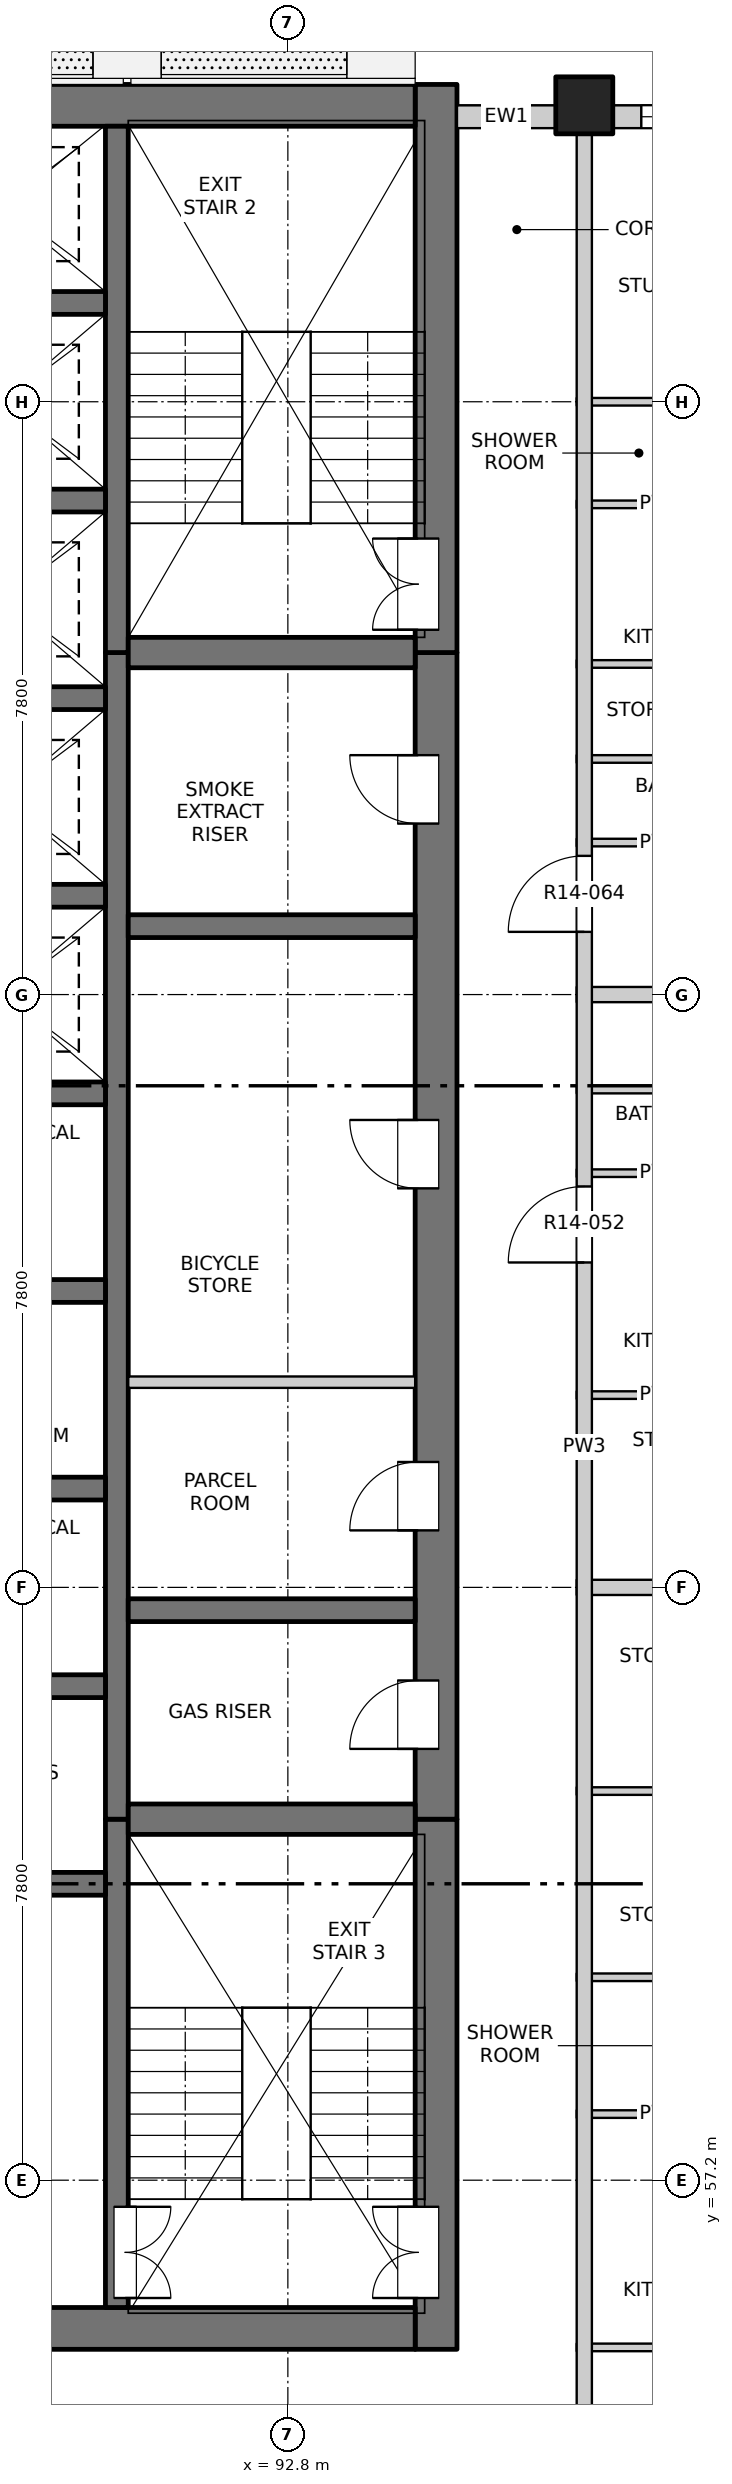
"""IFC4 building model, lengths in metres.
Left out: names, types, materials, properties, quantities, classifications, styles, units other than length and angle.
Written with IfcOpenShell. Run it as: python <this file> out.ifc"""

import sys

from ifc_helpers import new_model, si_unit, direction, frame, frame_2d, origin, origin_2d, place, context, subcontext, project, spatial, rectangle, extrude, element, fill, save


model = new_model("IFC4")
c1 = context("Model", 3, precision=1e-05, world=origin(), true_north=direction((0.0, 1.0)))
c2 = subcontext(c1, "Body", "Model", "MODEL_VIEW")
j1 = project(units=[si_unit("LENGTHUNIT", "METRE"), si_unit("PLANEANGLEUNIT", "RADIAN")], contexts=[c1])
p1 = place(None, origin())
s1 = spatial("IfcSite", under=j1, at=p1, CompositionType="ELEMENT")
p2 = place(p1, origin())
s2 = spatial("IfcBuilding", under=s1, at=p2, CompositionType="ELEMENT")
p3 = place(p2, frame((0.0, 0.0, 152.0)))
s3 = spatial("IfcBuildingStorey", under=s2, at=p3, CompositionType="ELEMENT", Elevation=152.0)
p4 = place(p3, frame((96.7, 84.5, -0.25), z_axis=(0.0, 0.0, 1.0), x_axis=(1.0, 0.0, 0.0)))
e1 = element("IfcColumn", 1, at=p4, inside=s3, PredefinedType="COLUMN", context=c2, shape_type="SweptSolid", body=[
    extrude(rectangle(XDim=0.75, YDim=0.75, at=origin_2d()), origin(), (0.0, 0.0, 1.0), 3.4),
])
p5 = place(p3, frame((94.75, 54.975, -0.25), z_axis=(0.0, 0.0, 1.0), x_axis=(0.0, 1.0, 0.0)))
e2 = element("IfcWall", 2, at=p5, inside=s3, PredefinedType="SOLIDWALL", context=c2, shape_type="SweptSolid", body=[
    extrude(rectangle(XDim=6.975, YDim=0.55, at=frame_2d((3.487, 0.0))), origin(), (0.0, 0.0, 1.0), 3.4),
])
p6 = place(p5, frame((0.675, 0.0, 0.25)))
e3 = element("IfcOpeningElement", 3, at=p6, cuts=e2, PredefinedType="OPENING", context=c2, shape_type="SweptSolid", body=[
    extrude(rectangle(XDim=1.2, YDim=2.1, at=frame_2d((0.6, 1.05))), frame((0.0, 0.285, 0.0), z_axis=(0.0, -1.0, 0.0), x_axis=(1.0, 0.0, 0.0)), (0.0, 0.0, 1.0), 0.57),
])
p7 = place(p3, frame((94.75, 61.95, -0.25), z_axis=(0.0, 0.0, 1.0), x_axis=(0.0, 1.0, 0.0)))
e4 = element("IfcWall", 4, at=p7, inside=s3, PredefinedType="SOLIDWALL", context=c2, shape_type="SweptSolid", body=[
    extrude(rectangle(XDim=15.35, YDim=0.55, at=frame_2d((7.675, 0.0))), origin(), (0.0, 0.0, 1.0), 3.4),
])
p8 = place(p7, frame((0.925, 0.0, 0.25)))
e5 = element("IfcOpeningElement", 5, at=p8, cuts=e4, PredefinedType="OPENING", context=c2, shape_type="SweptSolid", body=[
    extrude(rectangle(XDim=0.9, YDim=2.1, at=frame_2d((0.45, 1.05))), frame((0.0, 0.285, 0.0), z_axis=(0.0, -1.0, 0.0), x_axis=(1.0, 0.0, 0.0)), (0.0, 0.0, 1.0), 0.57),
])
p9 = place(p7, frame((3.8, 0.0, 0.25)))
e6 = element("IfcOpeningElement", 6, at=p9, cuts=e4, PredefinedType="OPENING", context=c2, shape_type="SweptSolid", body=[
    extrude(rectangle(XDim=0.9, YDim=2.1, at=frame_2d((0.45, 1.05))), frame((0.0, 0.285, 0.0), z_axis=(0.0, -1.0, 0.0), x_axis=(1.0, 0.0, 0.0)), (0.0, 0.0, 1.0), 0.57),
])
p10 = place(p7, frame((8.3, 0.0, 0.25)))
e7 = element("IfcOpeningElement", 7, at=p10, cuts=e4, PredefinedType="OPENING", context=c2, shape_type="SweptSolid", body=[
    extrude(rectangle(XDim=0.9, YDim=2.1, at=frame_2d((0.45, 1.05))), frame((0.0, 0.285, 0.0), z_axis=(0.0, -1.0, 0.0), x_axis=(1.0, 0.0, 0.0)), (0.0, 0.0, 1.0), 0.57),
])
p11 = place(p7, frame((13.1, 0.0, 0.25)))
e8 = element("IfcOpeningElement", 8, at=p11, cuts=e4, PredefinedType="OPENING", context=c2, shape_type="SweptSolid", body=[
    extrude(rectangle(XDim=0.9, YDim=2.1, at=frame_2d((0.45, 1.05))), frame((0.0, 0.285, 0.0), z_axis=(0.0, -1.0, 0.0), x_axis=(1.0, 0.0, 0.0)), (0.0, 0.0, 1.0), 0.57),
])
p12 = place(p3, frame((94.75, 77.3, -0.25), z_axis=(0.0, 0.0, 1.0), x_axis=(0.0, 1.0, 0.0)))
e9 = element("IfcWall", 9, at=p12, inside=s3, PredefinedType="SOLIDWALL", context=c2, shape_type="SweptSolid", body=[
    extrude(rectangle(XDim=7.475, YDim=0.55, at=frame_2d((3.737, 0.0))), origin(), (0.0, 0.0, 1.0), 3.4),
])
p13 = place(p12, frame((0.3, 0.0, 0.25)))
e10 = element("IfcOpeningElement", 10, at=p13, cuts=e9, PredefinedType="OPENING", context=c2, shape_type="SweptSolid", body=[
    extrude(rectangle(XDim=1.2, YDim=2.1, at=frame_2d((0.6, 1.05))), frame((0.0, 0.285, 0.0), z_axis=(0.0, -1.0, 0.0), x_axis=(1.0, 0.0, 0.0)), (0.0, 0.0, 1.0), 0.57),
])
p14 = place(p3, frame((75.525, 55.25, -0.25), z_axis=(0.0, 0.0, 1.0), x_axis=(1.0, 0.0, 0.0)))
e11 = element("IfcWall", 11, at=p14, inside=s3, PredefinedType="SOLIDWALL", context=c2, shape_type="SweptSolid", body=[
    extrude(rectangle(XDim=18.95, YDim=0.55, at=frame_2d((9.475, 0.0))), origin(), (0.0, 0.0, 1.0), 3.4),
])
p15 = place(p14, frame((8.725, 0.0, 0.25)))
e12 = element("IfcOpeningElement", 12, at=p15, cuts=e11, PredefinedType="OPENING", context=c2, shape_type="SweptSolid", body=[
    extrude(rectangle(XDim=1.5, YDim=2.1, at=frame_2d((0.75, 1.05))), frame((0.0, 0.285, 0.0), z_axis=(0.0, -1.0, 0.0), x_axis=(1.0, 0.0, 0.0)), (0.0, 0.0, 1.0), 0.57),
])
p16 = place(p3, frame((75.525, 84.5, -0.25), z_axis=(0.0, 0.0, 1.0), x_axis=(1.0, 0.0, 0.0)))
e13 = element("IfcWall", 13, at=p16, inside=s3, PredefinedType="SOLIDWALL", context=c2, shape_type="SweptSolid", body=[
    extrude(rectangle(XDim=18.95, YDim=0.55, at=frame_2d((9.475, 0.0))), origin(), (0.0, 0.0, 1.0), 3.4),
])
p17 = place(p3, frame((90.55, 55.525, -0.25), z_axis=(0.0, 0.0, 1.0), x_axis=(0.0, 1.0, 0.0)))
e14 = element("IfcWall", 14, at=p17, inside=s3, PredefinedType="SOLIDWALL", context=c2, shape_type="SweptSolid", body=[
    extrude(rectangle(XDim=6.425, YDim=0.3, at=frame_2d((3.212, 0.0))), origin(), (0.0, 0.0, 1.0), 3.4),
])
p18 = place(p17, frame((0.125, 0.0, 0.25)))
e15 = element("IfcOpeningElement", 15, at=p18, cuts=e14, PredefinedType="OPENING", context=c2, shape_type="SweptSolid", body=[
    extrude(rectangle(XDim=1.2, YDim=2.1, at=frame_2d((0.6, 1.05))), frame((0.0, 0.16, 0.0), z_axis=(0.0, -1.0, 0.0), x_axis=(1.0, 0.0, 0.0)), (0.0, 0.0, 1.0), 0.32),
])
p19 = place(p3, frame((90.55, 61.95, -0.25), z_axis=(0.0, 0.0, 1.0), x_axis=(0.0, 1.0, 0.0)))
e16 = element("IfcWall", 16, at=p19, inside=s3, PredefinedType="SOLIDWALL", context=c2, shape_type="SweptSolid", body=[
    extrude(rectangle(XDim=15.35, YDim=0.3, at=frame_2d((7.675, 0.0))), origin(), (0.0, 0.0, 1.0), 3.4),
])
p20 = place(p3, frame((90.55, 77.3, -0.25), z_axis=(0.0, 0.0, 1.0), x_axis=(0.0, 1.0, 0.0)))
e17 = element("IfcWall", 17, at=p20, inside=s3, PredefinedType="SOLIDWALL", context=c2, shape_type="SweptSolid", body=[
    extrude(rectangle(XDim=6.925, YDim=0.3, at=frame_2d((3.462, 0.0))), origin(), (0.0, 0.0, 1.0), 3.4),
])
for number, where, z_axis, x_axis in (
    (18, (87.4, 61.1, -0.25), (0.0, 0.0, 1.0), (1.0, 0.0, 0.0)),
    (19, (87.4, 63.7, -0.25), (0.0, 0.0, 1.0), (1.0, 0.0, 0.0)),
    (20, (87.4, 66.3, -0.25), (0.0, 0.0, 1.0), (1.0, 0.0, 0.0)),
    (21, (87.4, 68.9, -0.25), (0.0, 0.0, 1.0), (1.0, 0.0, 0.0)),
    (22, (87.4, 71.5, -0.25), (0.0, 0.0, 1.0), (1.0, 0.0, 0.0)),
    (23, (87.4, 74.1, -0.25), (0.0, 0.0, 1.0), (1.0, 0.0, 0.0)),
    (24, (87.4, 76.7, -0.25), (0.0, 0.0, 1.0), (1.0, 0.0, 0.0)),
    (25, (87.4, 79.3, -0.25), (0.0, 0.0, 1.0), (1.0, 0.0, 0.0)),
    (26, (87.4, 81.9, -0.25), (0.0, 0.0, 1.0), (1.0, 0.0, 0.0)),
):
    element("IfcWall", number, at=place(p3, frame(where, z_axis=z_axis, x_axis=x_axis)), inside=s3, PredefinedType="SOLIDWALL", context=c2, shape_type="SweptSolid", body=[
        extrude(rectangle(XDim=3.0, YDim=0.3, at=frame_2d((1.5, 0.0))), origin(), (0.0, 0.0, 1.0), 3.4),
    ])
p21 = place(p3, frame((90.7, 61.95, -0.25), z_axis=(0.0, 0.0, 1.0), x_axis=(1.0, 0.0, 0.0)))
e27 = element("IfcWall", 27, at=p21, inside=s3, PredefinedType="SOLIDWALL", context=c2, shape_type="SweptSolid", body=[
    extrude(rectangle(XDim=3.775, YDim=0.4, at=frame_2d((1.888, 0.0))), origin(), (0.0, 0.0, 1.0), 3.4),
])
for number, where, z_axis, x_axis in (
    (28, (90.7, 64.7, -0.25), (0.0, 0.0, 1.0), (1.0, 0.0, 0.0)),
    (29, (90.7, 73.7, -0.25), (0.0, 0.0, 1.0), (1.0, 0.0, 0.0)),
):
    element("IfcWall", number, at=place(p3, frame(where, z_axis=z_axis, x_axis=x_axis)), inside=s3, PredefinedType="SOLIDWALL", context=c2, shape_type="SweptSolid", body=[
        extrude(rectangle(XDim=3.775, YDim=0.3, at=frame_2d((1.888, 0.0))), origin(), (0.0, 0.0, 1.0), 3.4),
    ])
p22 = place(p3, frame((90.7, 77.3, -0.25), z_axis=(0.0, 0.0, 1.0), x_axis=(1.0, 0.0, 0.0)))
e30 = element("IfcWall", 30, at=p22, inside=s3, PredefinedType="SOLIDWALL", context=c2, shape_type="SweptSolid", body=[
    extrude(rectangle(XDim=3.775, YDim=0.4, at=frame_2d((1.888, 0.0))), origin(), (0.0, 0.0, 1.0), 3.4),
])
p23 = place(p3, frame((95.025, 84.35, 0.0), z_axis=(0.0, 0.0, 1.0), x_axis=(1.0, 0.0, 0.0)))
e31 = element("IfcWall", 31, at=p23, inside=s3, PredefinedType="SOLIDWALL", context=c2, shape_type="SweptSolid", body=[
    extrude(rectangle(XDim=1.3, YDim=0.3, at=frame_2d((0.65, 0.0))), origin(), (0.0, 0.0, 1.0), 2.7),
])
p24 = place(p3, frame((97.075, 84.35, 0.0), z_axis=(0.0, 0.0, 1.0), x_axis=(1.0, 0.0, 0.0)))
e32 = element("IfcWall", 32, at=p24, inside=s3, PredefinedType="SOLIDWALL", context=c2, shape_type="SweptSolid", body=[
    extrude(rectangle(XDim=3.525, YDim=0.3, at=frame_2d((1.763, 0.0))), origin(), (0.0, 0.0, 1.0), 2.7),
])
p25 = place(p24, frame((0.375, 0.0, 0.9)))
e33 = element("IfcOpeningElement", 33, at=p25, cuts=e32, PredefinedType="OPENING", context=c2, shape_type="SweptSolid", body=[
    extrude(rectangle(XDim=2.4, YDim=1.8, at=frame_2d((1.2, 0.9))), frame((0.0, 0.16, 0.0), z_axis=(0.0, -1.0, 0.0), x_axis=(1.0, 0.0, 0.0)), (0.0, 0.0, 1.0), 0.32),
])
for number, where, z_axis, x_axis in (
    (34, (96.6, 55.0, 0.0), (0.0, 0.0, 1.0), (1.0, 0.0, 0.0)),
    (35, (96.6, 58.07, 0.0), (0.0, 0.0, 1.0), (1.0, 0.0, 0.0)),
    (36, (96.6, 59.87, 0.0), (0.0, 0.0, 1.0), (1.0, 0.0, 0.0)),
    (37, (96.6, 62.32, 0.0), (0.0, 0.0, 1.0), (1.0, 0.0, 0.0)),
):
    element("IfcWall", number, at=place(p3, frame(where, z_axis=z_axis, x_axis=x_axis)), inside=s3, PredefinedType="PARTITIONING", context=c2, shape_type="SweptSolid", body=[
        extrude(rectangle(XDim=2.22, YDim=0.1, at=frame_2d((1.11, 0.0))), origin(), (0.0, 0.0, 1.0), 3.15),
    ])
p26 = place(p3, frame((96.6, 65.0, 0.0), z_axis=(0.0, 0.0, 1.0), x_axis=(1.0, 0.0, 0.0)))
e38 = element("IfcWall", 38, at=p26, inside=s3, PredefinedType="PARTITIONING", context=c2, shape_type="SweptSolid", body=[
    extrude(rectangle(XDim=7.6, YDim=0.2, at=frame_2d((3.8, 0.0))), origin(), (0.0, 0.0, 1.0), 3.15),
])
p27 = place(p3, frame((96.6, 67.53, 0.0), z_axis=(0.0, 0.0, 1.0), x_axis=(1.0, 0.0, 0.0)))
e39 = element("IfcWall", 39, at=p27, inside=s3, PredefinedType="PARTITIONING", context=c2, shape_type="SweptSolid", body=[
    extrude(rectangle(XDim=2.22, YDim=0.1, at=frame_2d((1.11, 0.0))), origin(), (0.0, 0.0, 1.0), 3.15),
])
p28 = place(p3, frame((90.7, 67.7, 0.0), z_axis=(0.0, 0.0, 1.0), x_axis=(1.0, 0.0, 0.0)))
e40 = element("IfcWall", 40, at=p28, inside=s3, PredefinedType="PARTITIONING", context=c2, shape_type="SweptSolid", body=[
    extrude(rectangle(XDim=3.775, YDim=0.15, at=frame_2d((1.887, 0.0))), origin(), (0.0, 0.0, 1.0), 3.15),
])
for number, where, z_axis, x_axis in (
    (41, (96.6, 70.45, 0.0), (0.0, 0.0, 1.0), (1.0, 0.0, 0.0)),
    (42, (96.6, 71.55, 0.0), (0.0, 0.0, 1.0), (1.0, 0.0, 0.0)),
):
    element("IfcWall", number, at=place(p3, frame(where, z_axis=z_axis, x_axis=x_axis)), inside=s3, PredefinedType="PARTITIONING", context=c2, shape_type="SweptSolid", body=[
        extrude(rectangle(XDim=2.22, YDim=0.1, at=frame_2d((1.11, 0.0))), origin(), (0.0, 0.0, 1.0), 3.15),
    ])
p29 = place(p3, frame((96.6, 72.8, 0.0), z_axis=(0.0, 0.0, 1.0), x_axis=(1.0, 0.0, 0.0)))
e43 = element("IfcWall", 43, at=p29, inside=s3, PredefinedType="PARTITIONING", context=c2, shape_type="SweptSolid", body=[
    extrude(rectangle(XDim=7.6, YDim=0.2, at=frame_2d((3.8, 0.0))), origin(), (0.0, 0.0, 1.0), 3.15),
])
for number, where, z_axis, x_axis in (
    (44, (96.6, 74.8, 0.0), (0.0, 0.0, 1.0), (1.0, 0.0, 0.0)),
    (45, (96.6, 75.9, 0.0), (0.0, 0.0, 1.0), (1.0, 0.0, 0.0)),
    (46, (96.6, 77.15, 0.0), (0.0, 0.0, 1.0), (1.0, 0.0, 0.0)),
    (47, (96.6, 79.25, 0.0), (0.0, 0.0, 1.0), (1.0, 0.0, 0.0)),
):
    element("IfcWall", number, at=place(p3, frame(where, z_axis=z_axis, x_axis=x_axis)), inside=s3, PredefinedType="PARTITIONING", context=c2, shape_type="SweptSolid", body=[
        extrude(rectangle(XDim=2.22, YDim=0.1, at=frame_2d((1.11, 0.0))), origin(), (0.0, 0.0, 1.0), 3.15),
    ])
p30 = place(p3, frame((96.6, 80.6, 0.0), z_axis=(0.0, 0.0, 1.0), x_axis=(1.0, 0.0, 0.0)))
e48 = element("IfcWall", 48, at=p30, inside=s3, PredefinedType="PARTITIONING", context=c2, shape_type="SweptSolid", body=[
    extrude(rectangle(XDim=7.6, YDim=0.1, at=frame_2d((3.8, 0.0))), origin(), (0.0, 0.0, 1.0), 3.15),
])
p31 = place(p30, frame((2.56, 0.0, 0.0)))
e49 = element("IfcOpeningElement", 49, at=p31, cuts=e48, PredefinedType="OPENING", context=c2, shape_type="SweptSolid", body=[
    extrude(rectangle(XDim=0.9, YDim=2.1, at=frame_2d((0.45, 1.05))), frame((0.0, 0.06, 0.0), z_axis=(0.0, -1.0, 0.0), x_axis=(1.0, 0.0, 0.0)), (0.0, 0.0, 1.0), 0.12),
])
p32 = place(p3, frame((96.7, 49.5, 0.0), z_axis=(0.0, 0.0, 1.0), x_axis=(0.0, 1.0, 0.0)))
e50 = element("IfcWall", 50, at=p32, inside=s3, PredefinedType="PARTITIONING", context=c2, shape_type="SweptSolid", body=[
    extrude(rectangle(XDim=34.7, YDim=0.2, at=frame_2d((17.35, 0.0))), origin(), (0.0, 0.0, 1.0), 3.15),
])
p33 = place(p32, frame((3.225, 0.0, 0.0)))
e51 = element("IfcOpeningElement", 51, at=p33, cuts=e50, PredefinedType="OPENING", context=c2, shape_type="SweptSolid", body=[
    extrude(rectangle(XDim=1.0, YDim=2.1, at=frame_2d((0.5, 1.05))), frame((0.0, 0.11, 0.0), z_axis=(0.0, -1.0, 0.0), x_axis=(1.0, 0.0, 0.0)), (0.0, 0.0, 1.0), 0.22),
])
p34 = place(p32, frame((19.775, 0.0, 0.0)))
e52 = element("IfcOpeningElement", 52, at=p34, cuts=e50, PredefinedType="OPENING", context=c2, shape_type="SweptSolid", body=[
    extrude(rectangle(XDim=1.0, YDim=2.1, at=frame_2d((0.5, 1.05))), frame((0.0, 0.11, 0.0), z_axis=(0.0, -1.0, 0.0), x_axis=(1.0, 0.0, 0.0)), (0.0, 0.0, 1.0), 0.22),
])
p35 = place(p32, frame((24.125, 0.0, 0.0)))
e53 = element("IfcOpeningElement", 53, at=p35, cuts=e50, PredefinedType="OPENING", context=c2, shape_type="SweptSolid", body=[
    extrude(rectangle(XDim=1.0, YDim=2.1, at=frame_2d((0.5, 1.05))), frame((0.0, 0.11, 0.0), z_axis=(0.0, -1.0, 0.0), x_axis=(1.0, 0.0, 0.0)), (0.0, 0.0, 1.0), 0.22),
])
p36 = place(p25, origin())
e54 = element("IfcWindow", 54, at=p36, inside=s3, PartitioningType="DOUBLE_PANEL_VERTICAL", PredefinedType="WINDOW", context=c2, shape_type="SweptSolid", body=[
    extrude(rectangle(XDim=2.4, YDim=1.8, at=frame_2d((1.2, 0.9))), frame((0.0, 0.03, 0.0), z_axis=(0.0, -1.0, 0.0), x_axis=(1.0, 0.0, 0.0)), (0.0, 0.0, 1.0), 0.06),
])
fill(e33, e54)
p37 = place(p18, origin())
e55 = element("IfcDoor", 55, at=p37, inside=s3, OperationType="DOUBLE_DOOR_SINGLE_SWING", PredefinedType="DOOR", context=c2, shape_type="SweptSolid", body=[
    extrude(rectangle(XDim=1.2, YDim=2.1, at=frame_2d((0.6, 1.05))), frame((0.0, -0.085, 0.0), z_axis=(0.0, -1.0, 0.0), x_axis=(1.0, 0.0, 0.0)), (0.0, 0.0, 1.0), 0.05),
])
fill(e15, e55)
p38 = place(p6, origin())
e56 = element("IfcDoor", 56, at=p38, inside=s3, OperationType="DOUBLE_DOOR_SINGLE_SWING", PredefinedType="DOOR", context=c2, shape_type="SweptSolid", body=[
    extrude(rectangle(XDim=1.2, YDim=2.1, at=frame_2d((0.6, 1.05))), frame((0.0, 0.26, 0.0), z_axis=(0.0, -1.0, 0.0), x_axis=(1.0, 0.0, 0.0)), (0.0, 0.0, 1.0), 0.05),
])
fill(e3, e56)
p39 = place(p8, origin())
e57 = element("IfcDoor", 57, at=p39, inside=s3, OperationType="SINGLE_SWING_LEFT", PredefinedType="DOOR", context=c2, shape_type="SweptSolid", body=[
    extrude(rectangle(XDim=0.9, YDim=2.1, at=frame_2d((0.45, 1.05))), frame((0.0, 0.26, 0.0), z_axis=(0.0, -1.0, 0.0), x_axis=(1.0, 0.0, 0.0)), (0.0, 0.0, 1.0), 0.05),
])
fill(e5, e57)
p40 = place(p9, origin())
e58 = element("IfcDoor", 58, at=p40, inside=s3, OperationType="SINGLE_SWING_LEFT", PredefinedType="DOOR", context=c2, shape_type="SweptSolid", body=[
    extrude(rectangle(XDim=0.9, YDim=2.1, at=frame_2d((0.45, 1.05))), frame((0.0, 0.26, 0.0), z_axis=(0.0, -1.0, 0.0), x_axis=(1.0, 0.0, 0.0)), (0.0, 0.0, 1.0), 0.05),
])
fill(e6, e58)
p41 = place(p34, origin())
e59 = element("IfcDoor", 59, at=p41, inside=s3, OperationType="SINGLE_SWING_RIGHT", PredefinedType="DOOR", context=c2, shape_type="SweptSolid", body=[
    extrude(rectangle(XDim=1.0, YDim=2.1, at=frame_2d((0.5, 1.05))), frame((0.0, 0.025, 0.0), z_axis=(0.0, -1.0, 0.0), x_axis=(1.0, 0.0, 0.0)), (0.0, 0.0, 1.0), 0.05),
])
fill(e52, e59)
p42 = place(p10, origin())
e60 = element("IfcDoor", 60, at=p42, inside=s3, OperationType="SINGLE_SWING_RIGHT", PredefinedType="DOOR", context=c2, shape_type="SweptSolid", body=[
    extrude(rectangle(XDim=0.9, YDim=2.1, at=frame_2d((0.45, 1.05))), frame((0.0, 0.26, 0.0), z_axis=(0.0, -1.0, 0.0), x_axis=(1.0, 0.0, 0.0)), (0.0, 0.0, 1.0), 0.05),
])
fill(e7, e60)
p43 = place(p35, origin())
e61 = element("IfcDoor", 61, at=p43, inside=s3, OperationType="SINGLE_SWING_RIGHT", PredefinedType="DOOR", context=c2, shape_type="SweptSolid", body=[
    extrude(rectangle(XDim=1.0, YDim=2.1, at=frame_2d((0.5, 1.05))), frame((0.0, 0.025, 0.0), z_axis=(0.0, -1.0, 0.0), x_axis=(1.0, 0.0, 0.0)), (0.0, 0.0, 1.0), 0.05),
])
fill(e53, e61)
p44 = place(p11, origin())
e62 = element("IfcDoor", 62, at=p44, inside=s3, OperationType="SINGLE_SWING_RIGHT", PredefinedType="DOOR", context=c2, shape_type="SweptSolid", body=[
    extrude(rectangle(XDim=0.9, YDim=2.1, at=frame_2d((0.45, 1.05))), frame((0.0, 0.26, 0.0), z_axis=(0.0, -1.0, 0.0), x_axis=(1.0, 0.0, 0.0)), (0.0, 0.0, 1.0), 0.05),
])
fill(e8, e62)
p45 = place(p13, origin())
e63 = element("IfcDoor", 63, at=p45, inside=s3, OperationType="DOUBLE_DOOR_SINGLE_SWING", PredefinedType="DOOR", context=c2, shape_type="SweptSolid", body=[
    extrude(rectangle(XDim=1.2, YDim=2.1, at=frame_2d((0.6, 1.05))), frame((0.0, 0.26, 0.0), z_axis=(0.0, -1.0, 0.0), x_axis=(1.0, 0.0, 0.0)), (0.0, 0.0, 1.0), 0.05),
])
fill(e10, e63)
save(model, sys.argv[1])
